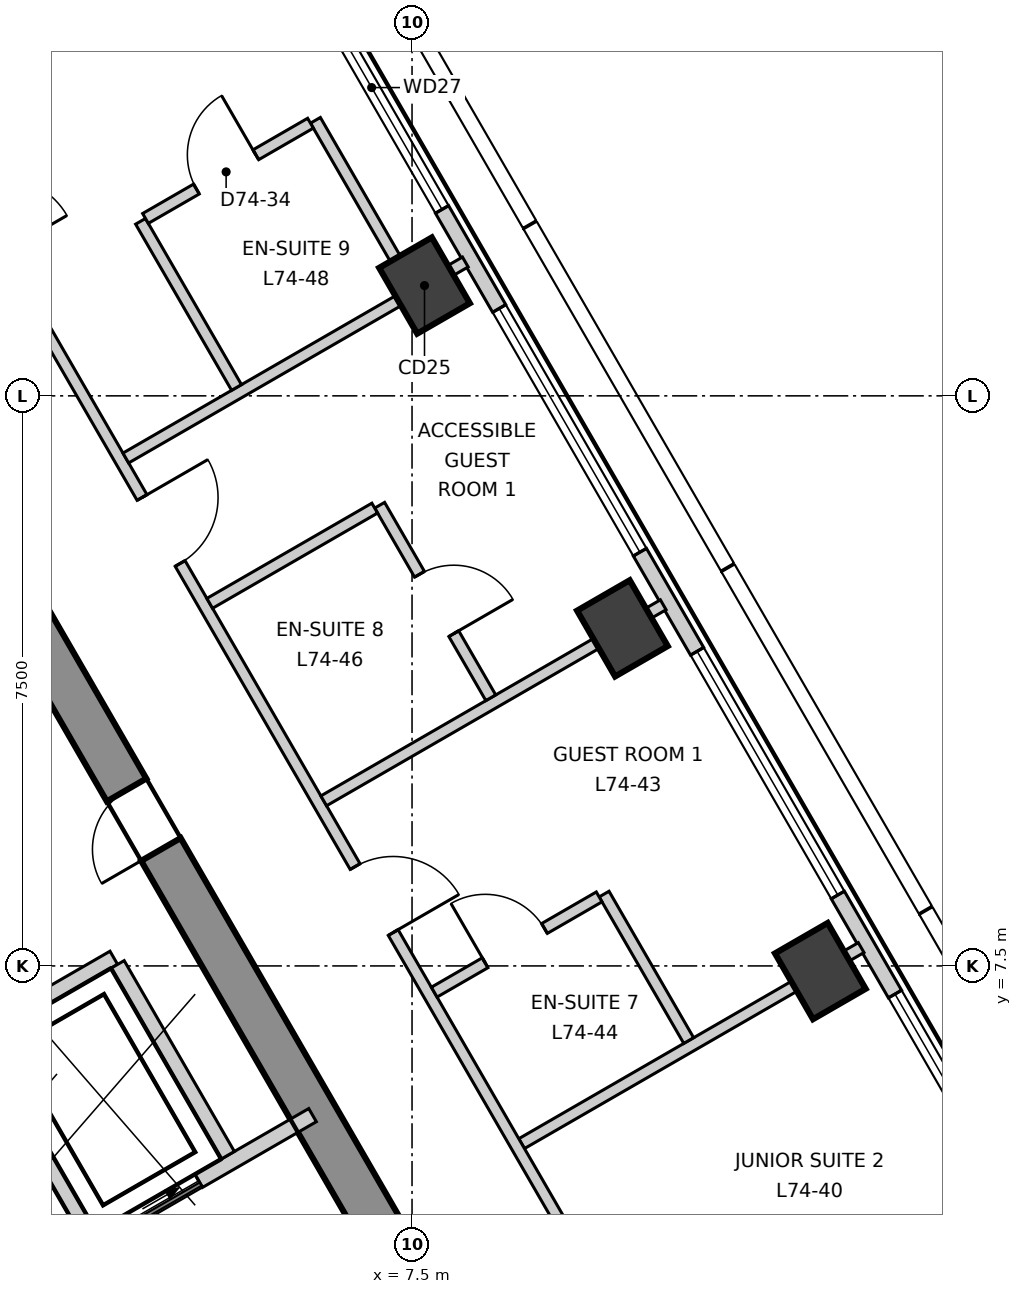
"""IFC4 building model, lengths in metres.
Left out: names, types, materials, properties, quantities, classifications, styles, units other than length and angle.
Written with IfcOpenShell. Run it as: python <this file> out.ifc"""

import sys

from ifc_helpers import new_model, si_unit, direction, frame, frame_2d, origin, origin_2d, place, context, subcontext, project, spatial, polyline, rectangle, outline, extrude, element, fill, save


model = new_model("IFC4")
c1 = context("Model", 3, precision=1e-05, world=origin(), true_north=direction((0.0, 1.0)))
c2 = subcontext(c1, "Body", "Model", "MODEL_VIEW")
j1 = project(units=[si_unit("LENGTHUNIT", "METRE"), si_unit("PLANEANGLEUNIT", "RADIAN")], contexts=[c1])
p1 = place(None, origin())
s1 = spatial("IfcSite", under=j1, at=p1, CompositionType="ELEMENT")
p2 = place(p1, origin())
s2 = spatial("IfcBuilding", under=s1, at=p2, CompositionType="ELEMENT")
p3 = place(p2, frame((0.0, 0.0, 311.5)))
s3 = spatial("IfcBuildingStorey", under=s2, at=p3, CompositionType="ELEMENT", Elevation=311.5)
p4 = place(p3, frame((12.384, -5.15, -0.3), z_axis=(0.0, 0.0, 1.0), x_axis=(-0.500000539815, 0.866025092122, 0.0)))
e1 = element("IfcWall", 1, at=p4, inside=s3, PredefinedType="SHEAR", context=c2, shape_type="SweptSolid", body=[
    extrude(outline(polyline([(-0.173, -0.301), (1.795, -0.301), (3.763, -0.301), (5.731, -0.301), (7.7, -0.301), (9.668, -0.301), (11.636, -0.301), (13.604, -0.3), (15.573, -0.3), (17.541, -0.3), (19.509, -0.3), (21.477, -0.3), (21.131, 0.3), (19.226, 0.3), (17.321, 0.3), (15.415, 0.3), (13.51, 0.3), (11.605, 0.3), (9.699, 0.3), (7.794, 0.3), (5.889, 0.3), (3.984, 0.3), (2.078, 0.3), (0.173, 0.3), (-0.173, -0.301)])), origin(), (0.0, 0.0, 1.0), 3.6),
])
p5 = place(p4, frame((16.378, 0.0, 0.3)))
e2 = element("IfcOpeningElement", 2, at=p5, cuts=e1, PredefinedType="OPENING", context=c2, shape_type="SweptSolid", body=[
    extrude(rectangle(XDim=0.9, YDim=2.1, at=frame_2d((0.45, 1.05))), frame((0.0, 0.31, 0.0), z_axis=(0.0, -1.0, 0.0), x_axis=(1.0, 0.0, 0.0)), (0.0, 0.0, 1.0), 0.621),
])
p6 = place(p4, frame((4.026, 0.0, 0.3)))
e3 = element("IfcOpeningElement", 3, at=p6, cuts=e1, PredefinedType="OPENING", context=c2, shape_type="SweptSolid", body=[
    extrude(rectangle(XDim=0.9, YDim=2.1, at=frame_2d((0.45, 1.05))), frame((0.0, 0.31, 0.0), z_axis=(0.0, -1.0, 0.0), x_axis=(1.0, 0.0, 0.0)), (0.0, 0.0, 1.0), 0.621),
])
for number, where, z_axis, x_axis in (
    (4, (12.872, 7.432, -0.3), (0.0, 0.0, 1.0), (-0.5, 0.866, 0.0)),
    (5, (10.268, 11.941, -0.3), (0.0, 0.0, 1.0), (-0.5, 0.866, 0.0)),
    (6, (7.664, 16.451, -0.3), (0.0, 0.0, 1.0), (-0.5, 0.866, 0.0)),
):
    element("IfcColumn", number, at=place(p3, frame(where, z_axis=z_axis, x_axis=x_axis)), inside=s3, PredefinedType="COLUMN", context=c2, shape_type="SweptSolid", body=[
        extrude(rectangle(XDim=1.0, YDim=0.8, at=origin_2d()), origin(), (0.0, 0.0, 1.0), 3.6),
    ])
p7 = place(p3, frame((24.544, -11.385, 0.0), z_axis=(0.0, 0.0, 1.0), x_axis=(-0.500002044679, 0.866024223285, 0.0)))
e7 = element("IfcWall", 7, at=p7, inside=s3, PredefinedType="ELEMENTEDWALL", context=c2, shape_type="SweptSolid", body=[
    extrude(rectangle(XDim=44.243, YDim=0.2, at=frame_2d((22.122, 0.0))), origin(), (0.0, 0.0, 1.0), 3.3),
])
p8 = place(p7, frame((2.056, 0.0, 0.9)))
e8 = element("IfcOpeningElement", 8, at=p8, cuts=e7, PredefinedType="OPENING", context=c2, shape_type="SweptSolid", body=[
    extrude(rectangle(XDim=3.7, YDim=2.2, at=frame_2d((1.85, 1.1))), frame((0.0, 0.11, 0.0), z_axis=(0.0, -1.0, 0.0), x_axis=(1.0, 0.0, 0.0)), (0.0, 0.0, 1.0), 0.22),
])
p9 = place(p7, frame((7.264, 0.0, 0.9)))
e9 = element("IfcOpeningElement", 9, at=p9, cuts=e7, PredefinedType="OPENING", context=c2, shape_type="SweptSolid", body=[
    extrude(rectangle(XDim=3.7, YDim=2.2, at=frame_2d((1.85, 1.1))), frame((0.0, 0.11, 0.0), z_axis=(0.0, -1.0, 0.0), x_axis=(1.0, 0.0, 0.0)), (0.0, 0.0, 1.0), 0.22),
])
p10 = place(p7, frame((12.471, 0.0, 0.9)))
e10 = element("IfcOpeningElement", 10, at=p10, cuts=e7, PredefinedType="OPENING", context=c2, shape_type="SweptSolid", body=[
    extrude(rectangle(XDim=3.7, YDim=2.2, at=frame_2d((1.85, 1.1))), frame((0.0, 0.11, 0.0), z_axis=(0.0, -1.0, 0.0), x_axis=(1.0, 0.0, 0.0)), (0.0, 0.0, 1.0), 0.22),
])
p11 = place(p7, frame((17.678, 0.0, 0.9)))
e11 = element("IfcOpeningElement", 11, at=p11, cuts=e7, PredefinedType="OPENING", context=c2, shape_type="SweptSolid", body=[
    extrude(rectangle(XDim=3.7, YDim=2.2, at=frame_2d((1.85, 1.1))), frame((0.0, 0.11, 0.0), z_axis=(0.0, -1.0, 0.0), x_axis=(1.0, 0.0, 0.0)), (0.0, 0.0, 1.0), 0.22),
])
p12 = place(p7, frame((22.885, 0.0, 0.9)))
e12 = element("IfcOpeningElement", 12, at=p12, cuts=e7, PredefinedType="OPENING", context=c2, shape_type="SweptSolid", body=[
    extrude(rectangle(XDim=3.7, YDim=2.2, at=frame_2d((1.85, 1.1))), frame((0.0, 0.11, 0.0), z_axis=(0.0, -1.0, 0.0), x_axis=(1.0, 0.0, 0.0)), (0.0, 0.0, 1.0), 0.22),
])
p13 = place(p7, frame((28.093, 0.0, 0.9)))
e13 = element("IfcOpeningElement", 13, at=p13, cuts=e7, PredefinedType="OPENING", context=c2, shape_type="SweptSolid", body=[
    extrude(rectangle(XDim=3.7, YDim=2.2, at=frame_2d((1.85, 1.1))), frame((0.0, 0.11, 0.0), z_axis=(0.0, -1.0, 0.0), x_axis=(1.0, 0.0, 0.0)), (0.0, 0.0, 1.0), 0.22),
])
p14 = place(p7, frame((33.3, 0.0, 0.9)))
e14 = element("IfcOpeningElement", 14, at=p14, cuts=e7, PredefinedType="OPENING", context=c2, shape_type="SweptSolid", body=[
    extrude(rectangle(XDim=3.7, YDim=2.2, at=frame_2d((1.85, 1.1))), frame((0.0, 0.11, 0.0), z_axis=(0.0, -1.0, 0.0), x_axis=(1.0, 0.0, 0.0)), (0.0, 0.0, 1.0), 0.22),
])
p15 = place(p7, frame((38.507, 0.0, 0.9)))
e15 = element("IfcOpeningElement", 15, at=p15, cuts=e7, PredefinedType="OPENING", context=c2, shape_type="SweptSolid", body=[
    extrude(rectangle(XDim=3.7, YDim=2.2, at=frame_2d((1.85, 1.1))), frame((0.0, 0.11, 0.0), z_axis=(0.0, -1.0, 0.0), x_axis=(1.0, 0.0, 0.0)), (0.0, 0.0, 1.0), 0.22),
])
p16 = place(p3, frame((8.942, 5.162, 0.0), z_axis=(0.0, 0.0, 1.0), x_axis=(0.86604134632, 0.499972385701, 0.0)))
e16 = element("IfcWall", 16, at=p16, inside=s3, PredefinedType="PARTITIONING", context=c2, shape_type="SweptSolid", body=[
    extrude(rectangle(XDim=5.158, YDim=0.15, at=frame_2d((2.579, 0.0))), origin(), (0.0, 0.0, 1.0), 2.8),
])
p17 = place(p3, frame((0.075, 20.37, 0.0), z_axis=(0.0, 0.0, 1.0), x_axis=(0.500006672087, -0.866021551619, 0.0)))
e17 = element("IfcWall", 17, at=p17, inside=s3, PredefinedType="PARTITIONING", context=c2, shape_type="SweptSolid", body=[
    extrude(rectangle(XDim=35.27, YDim=0.15, at=frame_2d((17.635, 0.0))), origin(), (0.0, 0.0, 1.0), 3.3),
])
p18 = place(p17, frame((31.206, 0.0, 0.0)))
e18 = element("IfcOpeningElement", 18, at=p18, cuts=e17, PredefinedType="OPENING", context=c2, shape_type="SweptSolid", body=[
    extrude(rectangle(XDim=1.0, YDim=2.1, at=frame_2d((0.5, 1.05))), frame((0.0, 0.085, 0.0), z_axis=(0.0, -1.0, 0.0), x_axis=(1.0, 0.0, 0.0)), (0.0, 0.0, 1.0), 0.17),
])
p19 = place(p17, frame((19.968, 0.0, 0.0)))
e19 = element("IfcOpeningElement", 19, at=p19, cuts=e17, PredefinedType="OPENING", context=c2, shape_type="SweptSolid", body=[
    extrude(rectangle(XDim=1.0, YDim=2.1, at=frame_2d((0.5, 1.05))), frame((0.0, 0.085, 0.0), z_axis=(0.0, -1.0, 0.0), x_axis=(1.0, 0.0, 0.0)), (0.0, 0.0, 1.0), 0.17),
])
p20 = place(p17, frame((13.353, 0.0, 0.0)))
e20 = element("IfcOpeningElement", 20, at=p20, cuts=e17, PredefinedType="OPENING", context=c2, shape_type="SweptSolid", body=[
    extrude(rectangle(XDim=1.0, YDim=2.1, at=frame_2d((0.5, 1.05))), frame((0.0, 0.085, 0.0), z_axis=(0.0, -1.0, 0.0), x_axis=(1.0, 0.0, 0.0)), (0.0, 0.0, 1.0), 0.17),
])
p21 = place(p17, frame((7.746, 0.0, 0.0)))
e21 = element("IfcOpeningElement", 21, at=p21, cuts=e17, PredefinedType="OPENING", context=c2, shape_type="SweptSolid", body=[
    extrude(rectangle(XDim=1.0, YDim=2.1, at=frame_2d((0.5, 1.05))), frame((0.0, 0.085, 0.0), z_axis=(0.0, -1.0, 0.0), x_axis=(1.0, 0.0, 0.0)), (0.0, 0.0, 1.0), 0.17),
])
p22 = place(p17, frame((3.038, 0.0, 0.0)))
e22 = element("IfcOpeningElement", 22, at=p22, cuts=e17, PredefinedType="OPENING", context=c2, shape_type="SweptSolid", body=[
    extrude(rectangle(XDim=1.0, YDim=2.1, at=frame_2d((0.5, 1.05))), frame((0.0, 0.085, 0.0), z_axis=(0.0, -1.0, 0.0), x_axis=(1.0, 0.0, 0.0)), (0.0, 0.0, 1.0), 0.17),
])
p23 = place(p3, frame((3.734, 14.182, 0.0), z_axis=(0.0, 0.0, 1.0), x_axis=(0.866020851292, 0.500007885066, 0.0)))
e23 = element("IfcWall", 23, at=p23, inside=s3, PredefinedType="PARTITIONING", context=c2, shape_type="SweptSolid", body=[
    extrude(rectangle(XDim=5.158, YDim=0.15, at=frame_2d((2.579, 0.0))), origin(), (0.0, 0.0, 1.0), 3.3),
])
p24 = place(p3, frame((6.338, 9.672, 0.0), z_axis=(0.0, 0.0, 1.0), x_axis=(0.86604134632, 0.499972385701, 0.0)))
e24 = element("IfcWall", 24, at=p24, inside=s3, PredefinedType="PARTITIONING", context=c2, shape_type="SweptSolid", body=[
    extrude(rectangle(XDim=5.158, YDim=0.15, at=frame_2d((2.579, 0.0))), origin(), (0.0, 0.0, 1.0), 3.3),
])
p25 = place(p3, frame((7.074, 13.561, 0.0), z_axis=(0.0, 0.0, 1.0), x_axis=(0.499874209568, -0.866098016745, 0.0)))
e25 = element("IfcWall", 25, at=p25, inside=s3, PredefinedType="PARTITIONING", context=c2, shape_type="SweptSolid", body=[
    extrude(rectangle(XDim=2.925, YDim=0.15, at=frame_2d((1.462, 0.0))), origin(), (0.0, 0.0, 1.0), 3.3),
])
p26 = place(p25, frame((1.05, 0.0, 0.0)))
e26 = element("IfcOpeningElement", 26, at=p26, cuts=e25, PredefinedType="OPENING", context=c2, shape_type="SweptSolid", body=[
    extrude(rectangle(XDim=0.9, YDim=2.1, at=frame_2d((0.45, 1.05))), frame((0.0, 0.085, 0.0), z_axis=(0.0, -1.0, 0.0), x_axis=(1.0, 0.0, 0.0)), (0.0, 0.0, 1.0), 0.17),
])
p27 = place(p3, frame((10.027, 8.445, 0.0), z_axis=(0.0, 0.0, 1.0), x_axis=(0.500080171303, -0.865979111913, 0.0)))
e27 = element("IfcWall", 27, at=p27, inside=s3, PredefinedType="PARTITIONING", context=c2, shape_type="SweptSolid", body=[
    extrude(rectangle(XDim=2.225, YDim=0.15, at=frame_2d((1.113, 0.0))), origin(), (0.0, 0.0, 1.0), 3.3),
])
p28 = place(p3, frame((4.838, 12.27, 0.0), z_axis=(0.0, 0.0, 1.0), x_axis=(0.866125586781, 0.4998264378, 0.0)))
e28 = element("IfcWall", 28, at=p28, inside=s3, PredefinedType="PARTITIONING", context=c2, shape_type="SweptSolid", body=[
    extrude(rectangle(XDim=2.507, YDim=0.15, at=frame_2d((1.253, 0.0))), origin(), (0.0, 0.0, 1.0), 3.3),
])
p29 = place(p3, frame((7.792, 7.155, 0.0), z_axis=(0.0, 0.0, 1.0), x_axis=(0.866003851672, 0.500037327496, 0.0)))
e29 = element("IfcWall", 29, at=p29, inside=s3, PredefinedType="PARTITIONING", context=c2, shape_type="SweptSolid", body=[
    extrude(rectangle(XDim=2.506, YDim=0.15, at=frame_2d((1.253, 0.0))), origin(), (0.0, 0.0, 1.0), 3.3),
])
p30 = place(p29, frame((0.774, 0.0, 0.0)))
e30 = element("IfcOpeningElement", 30, at=p30, cuts=e29, PredefinedType="OPENING", context=c2, shape_type="SweptSolid", body=[
    extrude(rectangle(XDim=0.9, YDim=2.1, at=frame_2d((0.45, 1.05))), frame((0.0, 0.085, 0.0), z_axis=(0.0, -1.0, 0.0), x_axis=(1.0, 0.0, 0.0)), (0.0, 0.0, 1.0), 0.17),
])
p31 = place(p3, frame((3.928, 17.296, 0.0), z_axis=(0.0, 0.0, 1.0), x_axis=(0.50028887667, -0.865858556509, 0.0)))
e31 = element("IfcWall", 31, at=p31, inside=s3, PredefinedType="PARTITIONING", context=c2, shape_type="SweptSolid", body=[
    extrude(rectangle(XDim=2.524, YDim=0.15, at=frame_2d((1.262, 0.0))), origin(), (0.0, 0.0, 1.0), 3.3),
])
p32 = place(p3, frame((6.229, 18.625, 0.0), z_axis=(0.0, 0.0, 1.0), x_axis=(0.499789415832, -0.866146950478, 0.0)))
e32 = element("IfcWall", 32, at=p32, inside=s3, PredefinedType="PARTITIONING", context=c2, shape_type="SweptSolid", body=[
    extrude(rectangle(XDim=2.525, YDim=0.15, at=frame_2d((1.262, 0.0))), origin(), (0.0, 0.0, 1.0), 2.6),
])
p33 = place(p3, frame((3.993, 17.334, 0.0), z_axis=(0.0, 0.0, 1.0), x_axis=(0.866125586781, 0.4998264378, 0.0)))
e33 = element("IfcWall", 33, at=p33, inside=s3, PredefinedType="PARTITIONING", context=c2, shape_type="SweptSolid", body=[
    extrude(rectangle(XDim=2.507, YDim=0.15, at=frame_2d((1.253, 0.0))), origin(), (0.0, 0.0, 1.0), 3.3),
])
p34 = place(p33, frame((0.775, 0.0, 0.0)))
e34 = element("IfcOpeningElement", 34, at=p34, cuts=e33, PredefinedType="OPENING", context=c2, shape_type="SweptSolid", body=[
    extrude(rectangle(XDim=0.9, YDim=2.1, at=frame_2d((0.45, 1.05))), frame((0.0, 0.085, 0.0), z_axis=(0.0, -1.0, 0.0), x_axis=(1.0, 0.0, 0.0)), (0.0, 0.0, 1.0), 0.17),
])
p35 = place(p3, frame((-0.002, 5.541, 0.0), z_axis=(0.0, 0.0, 1.0), x_axis=(0.86600155993, 0.500041296494, 0.0)))
e35 = element("IfcWall", 35, at=p35, inside=s3, PredefinedType="SOLIDWALL", context=c2, shape_type="SweptSolid", body=[
    extrude(rectangle(XDim=4.132, YDim=0.2, at=frame_2d((2.066, 0.0))), origin(), (0.0, 0.0, 1.0), 3.3),
])
p36 = place(p3, frame((1.578, 2.874, 0.0), z_axis=(0.0, 0.0, 1.0), x_axis=(0.866045911672, 0.499964477614, 0.0)))
e36 = element("IfcWall", 36, at=p36, inside=s3, PredefinedType="SOLIDWALL", context=c2, shape_type="SweptSolid", body=[
    extrude(rectangle(XDim=5.327, YDim=0.2, at=frame_2d((2.663, 0.0))), origin(), (0.0, 0.0, 1.0), 3.3),
])
p37 = place(p36, frame((2.496, 0.0, 0.0)))
e37 = element("IfcOpeningElement", 37, at=p37, cuts=e36, PredefinedType="OPENING", context=c2, shape_type="SweptSolid", body=[
    extrude(rectangle(XDim=1.1, YDim=2.1, at=frame_2d((0.55, 1.05))), frame((0.0, 0.11, 0.0), z_axis=(0.0, -1.0, 0.0), x_axis=(1.0, 0.0, 0.0)), (0.0, 0.0, 1.0), 0.22),
])
for number, where, z_axis, x_axis in (
    (38, (3.626, 7.52, 0.0), (0.0, 0.0, 1.0), (0.5, -0.866, 0.0)),
    (39, (1.807, 6.47, 0.0), (0.0, 0.0, 1.0), (0.5, -0.866, 0.0)),
):
    element("IfcWall", number, at=place(p3, frame(where, z_axis=z_axis, x_axis=x_axis)), inside=s3, PredefinedType="SOLIDWALL", context=c2, shape_type="SweptSolid", body=[
        extrude(rectangle(XDim=2.9, YDim=0.2, at=frame_2d((1.45, 0.0))), origin(), (0.0, 0.0, 1.0), 3.3),
    ])
p38 = place(p11, origin())
e40 = element("IfcWindow", 40, at=p38, inside=s3, PartitioningType="SINGLE_PANEL", PredefinedType="WINDOW", context=c2, shape_type="SweptSolid", body=[
    extrude(rectangle(XDim=3.7, YDim=2.2, at=frame_2d((1.85, 1.1))), frame((0.0, 0.03, 0.0), z_axis=(0.0, -1.0, 0.0), x_axis=(1.0, 0.0, 0.0)), (0.0, 0.0, 1.0), 0.06),
])
fill(e11, e40)
p39 = place(p12, origin())
e41 = element("IfcWindow", 41, at=p39, inside=s3, PartitioningType="SINGLE_PANEL", PredefinedType="WINDOW", context=c2, shape_type="SweptSolid", body=[
    extrude(rectangle(XDim=3.7, YDim=2.2, at=frame_2d((1.85, 1.1))), frame((0.0, 0.03, 0.0), z_axis=(0.0, -1.0, 0.0), x_axis=(1.0, 0.0, 0.0)), (0.0, 0.0, 1.0), 0.06),
])
fill(e12, e41)
p40 = place(p13, origin())
e42 = element("IfcWindow", 42, at=p40, inside=s3, PartitioningType="SINGLE_PANEL", PredefinedType="WINDOW", context=c2, shape_type="SweptSolid", body=[
    extrude(rectangle(XDim=3.7, YDim=2.2, at=frame_2d((1.85, 1.1))), frame((0.0, 0.03, 0.0), z_axis=(0.0, -1.0, 0.0), x_axis=(1.0, 0.0, 0.0)), (0.0, 0.0, 1.0), 0.06),
])
fill(e13, e42)
p41 = place(p14, origin())
e43 = element("IfcWindow", 43, at=p41, inside=s3, PartitioningType="SINGLE_PANEL", PredefinedType="WINDOW", context=c2, shape_type="SweptSolid", body=[
    extrude(rectangle(XDim=3.7, YDim=2.2, at=frame_2d((1.85, 1.1))), frame((0.0, 0.03, 0.0), z_axis=(0.0, -1.0, 0.0), x_axis=(1.0, 0.0, 0.0)), (0.0, 0.0, 1.0), 0.06),
])
fill(e14, e43)
p42 = place(p37, origin())
e44 = element("IfcDoor", 44, at=p42, inside=s3, OperationType="SLIDING_TO_LEFT", PredefinedType="DOOR", context=c2, shape_type="SweptSolid", body=[
    extrude(rectangle(XDim=1.1, YDim=2.1, at=frame_2d((0.55, 1.05))), frame((0.0, 0.025, 0.0), z_axis=(0.0, -1.0, 0.0), x_axis=(1.0, 0.0, 0.0)), (0.0, 0.0, 1.0), 0.05),
])
fill(e37, e44)
p43 = place(p20, origin())
e45 = element("IfcDoor", 45, at=p43, inside=s3, OperationType="SINGLE_SWING_LEFT", PredefinedType="DOOR", context=c2, shape_type="SweptSolid", body=[
    extrude(rectangle(XDim=1.0, YDim=2.1, at=frame_2d((0.5, 1.05))), frame((0.0, 0.025, 0.0), z_axis=(0.0, -1.0, 0.0), x_axis=(1.0, 0.0, 0.0)), (0.0, 0.0, 1.0), 0.05),
])
fill(e20, e45)
p44 = place(p30, origin())
e46 = element("IfcDoor", 46, at=p44, inside=s3, OperationType="SINGLE_SWING_RIGHT", PredefinedType="DOOR", context=c2, shape_type="SweptSolid", body=[
    extrude(rectangle(XDim=0.9, YDim=2.1, at=frame_2d((0.45, 1.05))), frame((0.0, 0.025, 0.0), z_axis=(0.0, -1.0, 0.0), x_axis=(1.0, 0.0, 0.0)), (0.0, 0.0, 1.0), 0.05),
])
fill(e30, e46)
p45 = place(p21, origin())
e47 = element("IfcDoor", 47, at=p45, inside=s3, OperationType="SINGLE_SWING_RIGHT", PredefinedType="DOOR", context=c2, shape_type="SweptSolid", body=[
    extrude(rectangle(XDim=1.0, YDim=2.1, at=frame_2d((0.5, 1.05))), frame((0.0, 0.025, 0.0), z_axis=(0.0, -1.0, 0.0), x_axis=(1.0, 0.0, 0.0)), (0.0, 0.0, 1.0), 0.05),
])
fill(e21, e47)
p46 = place(p26, origin())
e48 = element("IfcDoor", 48, at=p46, inside=s3, OperationType="SINGLE_SWING_LEFT", PredefinedType="DOOR", context=c2, shape_type="SweptSolid", body=[
    extrude(rectangle(XDim=0.9, YDim=2.1, at=frame_2d((0.45, 1.05))), frame((0.0, 0.025, 0.0), z_axis=(0.0, -1.0, 0.0), x_axis=(1.0, 0.0, 0.0)), (0.0, 0.0, 1.0), 0.05),
])
fill(e26, e48)
p47 = place(p34, origin())
e49 = element("IfcDoor", 49, at=p47, inside=s3, OperationType="SINGLE_SWING_LEFT", PredefinedType="DOOR", context=c2, shape_type="SweptSolid", body=[
    extrude(rectangle(XDim=0.9, YDim=2.1, at=frame_2d((0.45, 1.05))), frame((0.0, 0.025, 0.0), z_axis=(0.0, -1.0, 0.0), x_axis=(1.0, 0.0, 0.0)), (0.0, 0.0, 1.0), 0.05),
])
fill(e34, e49)
p48 = place(p5, origin())
e50 = element("IfcDoor", 50, at=p48, inside=s3, OperationType="SINGLE_SWING_RIGHT", PredefinedType="DOOR", context=c2, shape_type="SweptSolid", body=[
    extrude(rectangle(XDim=0.9, YDim=2.1, at=frame_2d((0.45, 1.05))), frame((0.0, 0.025, 0.0), z_axis=(0.0, -1.0, 0.0), x_axis=(1.0, 0.0, 0.0)), (0.0, 0.0, 1.0), 0.05),
])
fill(e2, e50)
save(model, sys.argv[1])
